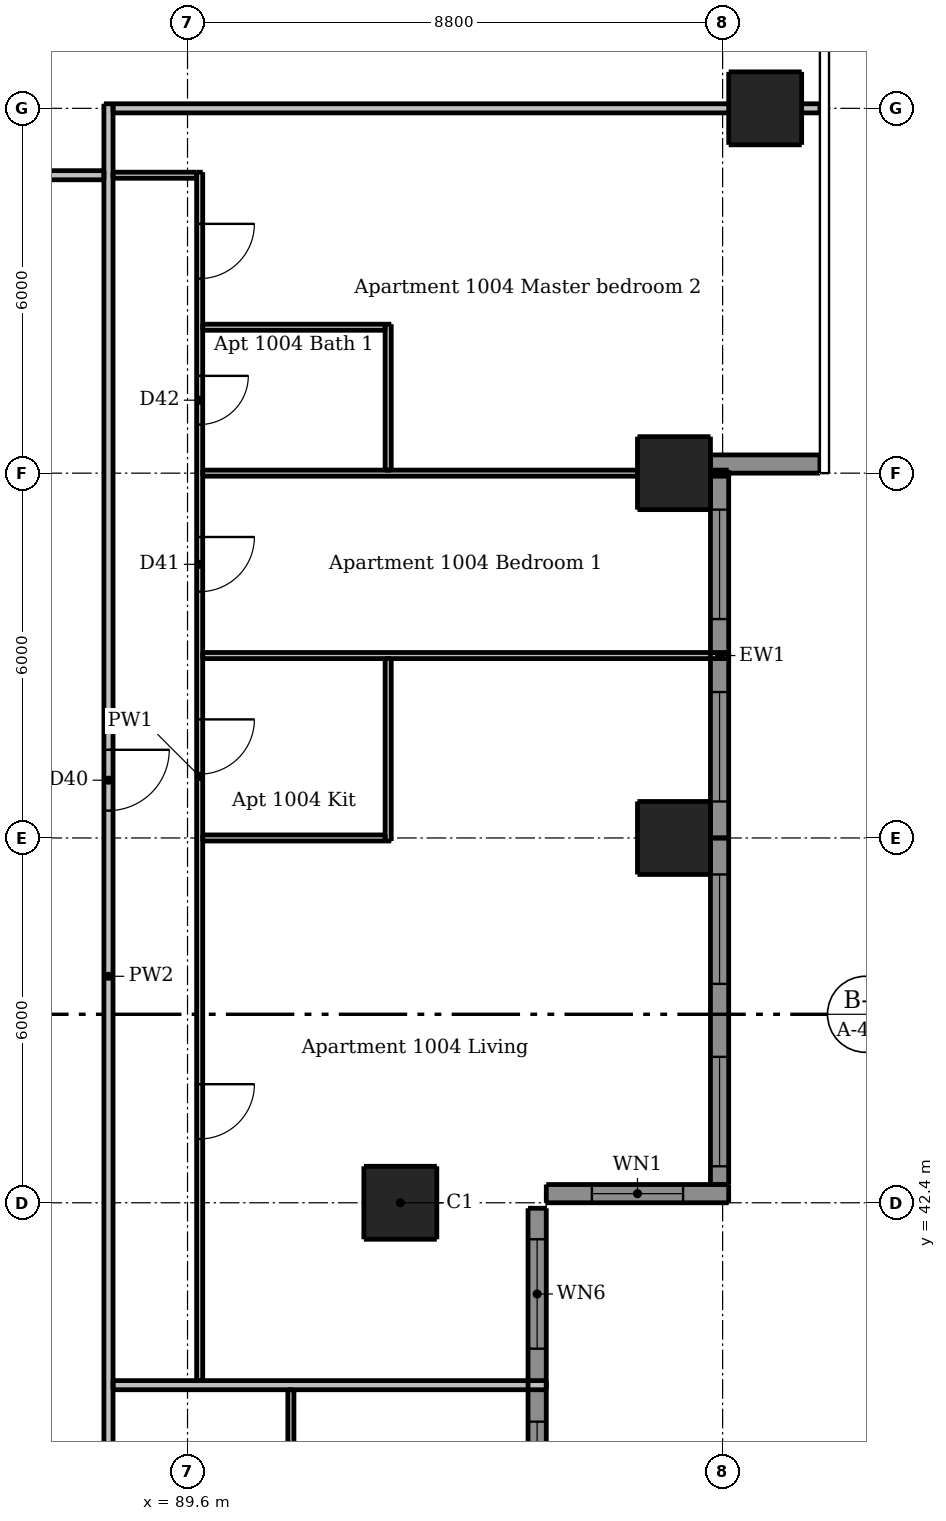
"""IFC4 building model, lengths in metres.
Left out: names, types, materials, properties, quantities, classifications, styles, units other than length and angle.
Written with IfcOpenShell. Run it as: python <this file> out.ifc"""

import sys

from ifc_helpers import new_model, si_unit, direction, frame, frame_2d, origin, origin_2d, place, context, subcontext, project, spatial, rectangle, extrude, element, fill, save


model = new_model("IFC4")
c1 = context("Model", 3, precision=1e-05, world=origin(), true_north=direction((0.0, 1.0)))
c2 = subcontext(c1, "Body", "Model", "MODEL_VIEW")
j1 = project(units=[si_unit("LENGTHUNIT", "METRE"), si_unit("PLANEANGLEUNIT", "RADIAN")], contexts=[c1])
p1 = place(None, origin())
s1 = spatial("IfcSite", under=j1, at=p1, CompositionType="ELEMENT")
p2 = place(p1, origin())
s2 = spatial("IfcBuilding", under=s1, at=p2, CompositionType="ELEMENT")
p3 = place(p2, frame((0.0, 0.0, 40.0)))
s3 = spatial("IfcBuildingStorey", under=s2, at=p3, CompositionType="ELEMENT", Elevation=40.0)
for number, where, z_axis, x_axis in (
    (1, (93.1, 42.4, 0.0), (0.0, 0.0, 1.0), (1.0, 0.0, 0.0)),
    (2, (97.6, 48.4, 0.0), (0.0, 0.0, 1.0), (1.0, 0.0, 0.0)),
    (3, (97.6, 54.4, 0.0), (0.0, 0.0, 1.0), (1.0, 0.0, 0.0)),
    (4, (99.1, 60.4, 0.0), (0.0, 0.0, 1.0), (1.0, 0.0, 0.0)),
):
    element("IfcColumn", number, at=place(p3, frame(where, z_axis=z_axis, x_axis=x_axis)), inside=s3, PredefinedType="COLUMN", context=c2, shape_type="SweptSolid", body=[
        extrude(rectangle(XDim=1.2, YDim=1.2, at=origin_2d()), origin(), (0.0, 0.0, 1.0), 3.05),
    ])
p4 = place(p3, frame((95.5, 42.55, 0.0), z_axis=(0.0, 0.0, 1.0), x_axis=(1.0, 0.0, 0.0)))
e5 = element("IfcWall", 5, at=p4, inside=s3, PredefinedType="SOLIDWALL", context=c2, shape_type="SweptSolid", body=[
    extrude(rectangle(XDim=3.0, YDim=0.3, at=frame_2d((1.5, 0.0))), origin(), (0.0, 0.0, 1.0), 3.05),
])
p5 = place(p4, frame((0.75, 0.0, 0.9)))
e6 = element("IfcOpeningElement", 6, at=p5, cuts=e5, PredefinedType="OPENING", context=c2, shape_type="SweptSolid", body=[
    extrude(rectangle(XDim=1.5, YDim=1.5, at=frame_2d((0.75, 0.75))), frame((0.0, 0.16, 0.0), z_axis=(0.0, -1.0, 0.0), x_axis=(1.0, 0.0, 0.0)), (0.0, 0.0, 1.0), 0.32),
])
p6 = place(p3, frame((98.2, 54.55, 0.0), z_axis=(0.0, 0.0, 1.0), x_axis=(1.0, 0.0, 0.0)))
e7 = element("IfcWall", 7, at=p6, inside=s3, PredefinedType="SOLIDWALL", context=c2, shape_type="SweptSolid", body=[
    extrude(rectangle(XDim=1.8, YDim=0.3, at=frame_2d((0.9, 0.0))), origin(), (0.0, 0.0, 1.0), 3.05),
])
p7 = place(p3, frame((95.35, 36.7, 0.0), z_axis=(0.0, 0.0, 1.0), x_axis=(0.0, 1.0, 0.0)))
e8 = element("IfcWall", 8, at=p7, inside=s3, PredefinedType="SOLIDWALL", context=c2, shape_type="SweptSolid", body=[
    extrude(rectangle(XDim=5.61, YDim=0.3, at=frame_2d((2.805, 0.0))), origin(), (0.0, 0.0, 1.0), 3.05),
])
p8 = place(p7, frame((0.3, 0.0, 0.15)))
e9 = element("IfcOpeningElement", 9, at=p8, cuts=e8, PredefinedType="OPENING", context=c2, shape_type="SweptSolid", body=[
    extrude(rectangle(XDim=1.8, YDim=2.1, at=frame_2d((0.9, 1.05))), frame((0.0, 0.16, 0.0), z_axis=(0.0, -1.0, 0.0), x_axis=(1.0, 0.0, 0.0)), (0.0, 0.0, 1.0), 0.32),
])
p9 = place(p7, frame((3.3, 0.0, 0.15)))
e10 = element("IfcOpeningElement", 10, at=p9, cuts=e8, PredefinedType="OPENING", context=c2, shape_type="SweptSolid", body=[
    extrude(rectangle(XDim=1.8, YDim=2.1, at=frame_2d((0.9, 1.05))), frame((0.0, 0.16, 0.0), z_axis=(0.0, -1.0, 0.0), x_axis=(1.0, 0.0, 0.0)), (0.0, 0.0, 1.0), 0.32),
])
p10 = place(p3, frame((98.35, 42.7, 0.0), z_axis=(0.0, 0.0, 1.0), x_axis=(0.0, 1.0, 0.0)))
e11 = element("IfcWall", 11, at=p10, inside=s3, PredefinedType="SOLIDWALL", context=c2, shape_type="SweptSolid", body=[
    extrude(rectangle(XDim=5.7, YDim=0.3, at=frame_2d((2.85, 0.0))), origin(), (0.0, 0.0, 1.0), 3.05),
])
p11 = place(p10, frame((0.3, 0.0, 0.15)))
e12 = element("IfcOpeningElement", 12, at=p11, cuts=e11, PredefinedType="OPENING", context=c2, shape_type="SweptSolid", body=[
    extrude(rectangle(XDim=1.8, YDim=2.1, at=frame_2d((0.9, 1.05))), frame((0.0, 0.16, 0.0), z_axis=(0.0, -1.0, 0.0), x_axis=(1.0, 0.0, 0.0)), (0.0, 0.0, 1.0), 0.32),
])
p12 = place(p10, frame((3.3, 0.0, 0.15)))
e13 = element("IfcOpeningElement", 13, at=p12, cuts=e11, PredefinedType="OPENING", context=c2, shape_type="SweptSolid", body=[
    extrude(rectangle(XDim=1.8, YDim=2.1, at=frame_2d((0.9, 1.05))), frame((0.0, 0.16, 0.0), z_axis=(0.0, -1.0, 0.0), x_axis=(1.0, 0.0, 0.0)), (0.0, 0.0, 1.0), 0.32),
])
p13 = place(p3, frame((98.35, 48.4, 0.0), z_axis=(0.0, 0.0, 1.0), x_axis=(0.0, 1.0, 0.0)))
e14 = element("IfcWall", 14, at=p13, inside=s3, PredefinedType="SOLIDWALL", context=c2, shape_type="SweptSolid", body=[
    extrude(rectangle(XDim=6.0, YDim=0.3, at=frame_2d((3.0, 0.0))), origin(), (0.0, 0.0, 1.0), 3.05),
])
p14 = place(p13, frame((0.6, 0.0, 0.15)))
e15 = element("IfcOpeningElement", 15, at=p14, cuts=e14, PredefinedType="OPENING", context=c2, shape_type="SweptSolid", body=[
    extrude(rectangle(XDim=1.8, YDim=2.1, at=frame_2d((0.9, 1.05))), frame((0.0, 0.16, 0.0), z_axis=(0.0, -1.0, 0.0), x_axis=(1.0, 0.0, 0.0)), (0.0, 0.0, 1.0), 0.32),
])
p15 = place(p13, frame((3.6, 0.0, 0.15)))
e16 = element("IfcOpeningElement", 16, at=p15, cuts=e14, PredefinedType="OPENING", context=c2, shape_type="SweptSolid", body=[
    extrude(rectangle(XDim=1.8, YDim=2.1, at=frame_2d((0.9, 1.05))), frame((0.0, 0.16, 0.0), z_axis=(0.0, -1.0, 0.0), x_axis=(1.0, 0.0, 0.0)), (0.0, 0.0, 1.0), 0.32),
])
p16 = place(p3, frame((89.8, 59.35, 0.0), z_axis=(0.0, 0.0, 1.0), x_axis=(0.0, -1.0, 0.0)))
e17 = element("IfcWall", 17, at=p16, inside=s3, PredefinedType="PARTITIONING", context=c2, shape_type="SweptSolid", body=[
    extrude(rectangle(XDim=19.875, YDim=0.1, at=frame_2d((9.938, 0.0))), origin(), (0.0, 0.0, 1.0), 3.05),
])
p17 = place(p16, frame((15.0, 0.0, 0.0)))
e18 = element("IfcOpeningElement", 18, at=p17, cuts=e17, PredefinedType="OPENING", context=c2, shape_type="SweptSolid", body=[
    extrude(rectangle(XDim=0.9, YDim=2.1, at=frame_2d((0.45, 1.05))), frame((0.0, 0.06, 0.0), z_axis=(0.0, -1.0, 0.0), x_axis=(1.0, 0.0, 0.0)), (0.0, 0.0, 1.0), 0.12),
])
p18 = place(p16, frame((9.0, 0.0, 0.0)))
e19 = element("IfcOpeningElement", 19, at=p18, cuts=e17, PredefinedType="OPENING", context=c2, shape_type="SweptSolid", body=[
    extrude(rectangle(XDim=0.9, YDim=2.1, at=frame_2d((0.45, 1.05))), frame((0.0, 0.06, 0.0), z_axis=(0.0, -1.0, 0.0), x_axis=(1.0, 0.0, 0.0)), (0.0, 0.0, 1.0), 0.12),
])
p19 = place(p16, frame((6.0, 0.0, 0.0)))
e20 = element("IfcOpeningElement", 20, at=p19, cuts=e17, PredefinedType="OPENING", context=c2, shape_type="SweptSolid", body=[
    extrude(rectangle(XDim=0.9, YDim=2.1, at=frame_2d((0.45, 1.05))), frame((0.0, 0.06, 0.0), z_axis=(0.0, -1.0, 0.0), x_axis=(1.0, 0.0, 0.0)), (0.0, 0.0, 1.0), 0.12),
])
p20 = place(p16, frame((0.85, 0.0, 0.0)))
e21 = element("IfcOpeningElement", 21, at=p20, cuts=e17, PredefinedType="OPENING", context=c2, shape_type="SweptSolid", body=[
    extrude(rectangle(XDim=0.9, YDim=2.1, at=frame_2d((0.45, 1.05))), frame((0.0, 0.06, 0.0), z_axis=(0.0, -1.0, 0.0), x_axis=(1.0, 0.0, 0.0)), (0.0, 0.0, 1.0), 0.12),
])
p21 = place(p16, frame((3.35, 0.0, 0.0)))
e22 = element("IfcOpeningElement", 22, at=p21, cuts=e17, PredefinedType="OPENING", context=c2, shape_type="SweptSolid", body=[
    extrude(rectangle(XDim=0.8, YDim=2.1, at=frame_2d((0.4, 1.05))), frame((0.0, 0.06, 0.0), z_axis=(0.0, -1.0, 0.0), x_axis=(1.0, 0.0, 0.0)), (0.0, 0.0, 1.0), 0.12),
])
p22 = place(p3, frame((91.3, 33.45, 0.0), z_axis=(0.0, 0.0, 1.0), x_axis=(0.0, 1.0, 0.0)))
e23 = element("IfcWall", 23, at=p22, inside=s3, PredefinedType="PARTITIONING", context=c2, shape_type="SweptSolid", body=[
    extrude(rectangle(XDim=5.875, YDim=0.1, at=frame_2d((2.938, 0.0))), origin(), (0.0, 0.0, 1.0), 3.05),
])
p23 = place(p22, frame((3.75, 0.0, 0.0)))
e24 = element("IfcOpeningElement", 24, at=p23, cuts=e23, PredefinedType="OPENING", context=c2, shape_type="SweptSolid", body=[
    extrude(rectangle(XDim=0.8, YDim=2.1, at=frame_2d((0.4, 1.05))), frame((0.0, 0.06, 0.0), z_axis=(0.0, -1.0, 0.0), x_axis=(1.0, 0.0, 0.0)), (0.0, 0.0, 1.0), 0.12),
])
p24 = place(p3, frame((92.9, 48.35, 0.0), z_axis=(0.0, 0.0, 1.0), x_axis=(0.0, 1.0, 0.0)))
e25 = element("IfcWall", 25, at=p24, inside=s3, PredefinedType="PARTITIONING", context=c2, shape_type="SweptSolid", body=[
    extrude(rectangle(XDim=3.0, YDim=0.1, at=frame_2d((1.5, 0.0))), origin(), (0.0, 0.0, 1.0), 3.05),
])
p25 = place(p3, frame((92.9, 54.45, 0.0), z_axis=(0.0, 0.0, 1.0), x_axis=(0.0, 1.0, 0.0)))
e26 = element("IfcWall", 26, at=p25, inside=s3, PredefinedType="PARTITIONING", context=c2, shape_type="SweptSolid", body=[
    extrude(rectangle(XDim=2.4, YDim=0.1, at=frame_2d((1.2, 0.0))), origin(), (0.0, 0.0, 1.0), 3.05),
])
p26 = place(p3, frame((88.375, 59.3, 0.0), z_axis=(0.0, 0.0, 1.0), x_axis=(1.0, 0.0, 0.0)))
e27 = element("IfcWall", 27, at=p26, inside=s3, PredefinedType="PARTITIONING", context=c2, shape_type="SweptSolid", body=[
    extrude(rectangle(XDim=1.375, YDim=0.1, at=frame_2d((0.688, 0.0))), origin(), (0.0, 0.0, 1.0), 3.05),
])
p27 = place(p3, frame((89.85, 56.8, 0.0), z_axis=(0.0, 0.0, 1.0), x_axis=(1.0, 0.0, 0.0)))
e28 = element("IfcWall", 28, at=p27, inside=s3, PredefinedType="PARTITIONING", context=c2, shape_type="SweptSolid", body=[
    extrude(rectangle(XDim=3.0, YDim=0.1, at=frame_2d((1.5, 0.0))), origin(), (0.0, 0.0, 1.0), 3.05),
])
p28 = place(p3, frame((89.85, 54.4, 0.0), z_axis=(0.0, 0.0, 1.0), x_axis=(1.0, 0.0, 0.0)))
e29 = element("IfcWall", 29, at=p28, inside=s3, PredefinedType="PARTITIONING", context=c2, shape_type="SweptSolid", body=[
    extrude(rectangle(XDim=8.65, YDim=0.1, at=frame_2d((4.325, 0.0))), origin(), (0.0, 0.0, 1.0), 2.516),
])
p29 = place(p3, frame((89.85, 51.4, 0.0), z_axis=(0.0, 0.0, 1.0), x_axis=(1.0, 0.0, 0.0)))
e30 = element("IfcWall", 30, at=p29, inside=s3, PredefinedType="PARTITIONING", context=c2, shape_type="SweptSolid", body=[
    extrude(rectangle(XDim=8.65, YDim=0.1, at=frame_2d((4.325, 0.0))), origin(), (0.0, 0.0, 1.0), 3.05),
])
p30 = place(p3, frame((89.85, 48.4, 0.0), z_axis=(0.0, 0.0, 1.0), x_axis=(1.0, 0.0, 0.0)))
e31 = element("IfcWall", 31, at=p30, inside=s3, PredefinedType="PARTITIONING", context=c2, shape_type="SweptSolid", body=[
    extrude(rectangle(XDim=3.0, YDim=0.1, at=frame_2d((1.5, 0.0))), origin(), (0.0, 0.0, 1.0), 2.516),
])
p31 = place(p3, frame((88.3, 60.475, 0.0), z_axis=(0.0, 0.0, 1.0), x_axis=(0.0, -1.0, 0.0)))
e32 = element("IfcWall", 32, at=p31, inside=s3, PredefinedType="PARTITIONING", context=c2, shape_type="SweptSolid", body=[
    extrude(rectangle(XDim=28.7, YDim=0.15, at=frame_2d((14.35, 0.0))), origin(), (0.0, 0.0, 1.0), 3.05),
])
p32 = place(p31, frame((27.425, 0.0, 0.0)))
e33 = element("IfcOpeningElement", 33, at=p32, cuts=e32, PredefinedType="OPENING", context=c2, shape_type="SweptSolid", body=[
    extrude(rectangle(XDim=1.0, YDim=2.1, at=frame_2d((0.5, 1.05))), frame((0.0, 0.085, 0.0), z_axis=(0.0, -1.0, 0.0), x_axis=(1.0, 0.0, 0.0)), (0.0, 0.0, 1.0), 0.17),
])
p33 = place(p31, frame((10.625, 0.0, 0.0)))
e34 = element("IfcOpeningElement", 34, at=p33, cuts=e32, PredefinedType="OPENING", context=c2, shape_type="SweptSolid", body=[
    extrude(rectangle(XDim=1.0, YDim=2.1, at=frame_2d((0.5, 1.05))), frame((0.0, 0.085, 0.0), z_axis=(0.0, -1.0, 0.0), x_axis=(1.0, 0.0, 0.0)), (0.0, 0.0, 1.0), 0.17),
])
p34 = place(p3, frame((88.375, 60.4, 0.0), z_axis=(0.0, 0.0, 1.0), x_axis=(1.0, 0.0, 0.0)))
e35 = element("IfcWall", 35, at=p34, inside=s3, PredefinedType="PARTITIONING", context=c2, shape_type="SweptSolid", body=[
    extrude(rectangle(XDim=11.625, YDim=0.15, at=frame_2d((5.812, 0.0))), origin(), (0.0, 0.0, 1.0), 2.516),
])
p35 = place(p3, frame((59.675, 59.3, 0.0), z_axis=(0.0, 0.0, 1.0), x_axis=(1.0, 0.0, 0.0)))
e36 = element("IfcWall", 36, at=p35, inside=s3, PredefinedType="PARTITIONING", context=c2, shape_type="SweptSolid", body=[
    extrude(rectangle(XDim=28.55, YDim=0.15, at=frame_2d((14.275, 0.0))), origin(), (0.0, 0.0, 1.0), 3.05),
])
p36 = place(p35, frame((8.975, 0.0, 0.0)))
e37 = element("IfcOpeningElement", 37, at=p36, cuts=e36, PredefinedType="OPENING", context=c2, shape_type="SweptSolid", body=[
    extrude(rectangle(XDim=1.0, YDim=2.1, at=frame_2d((0.5, 1.05))), frame((0.0, 0.085, 0.0), z_axis=(0.0, -1.0, 0.0), x_axis=(1.0, 0.0, 0.0)), (0.0, 0.0, 1.0), 0.17),
])
p37 = place(p35, frame((25.775, 0.0, 0.0)))
e38 = element("IfcOpeningElement", 38, at=p37, cuts=e36, PredefinedType="OPENING", context=c2, shape_type="SweptSolid", body=[
    extrude(rectangle(XDim=1.0, YDim=2.1, at=frame_2d((0.5, 1.05))), frame((0.0, 0.085, 0.0), z_axis=(0.0, -1.0, 0.0), x_axis=(1.0, 0.0, 0.0)), (0.0, 0.0, 1.0), 0.17),
])
p38 = place(p3, frame((88.375, 39.4, 0.0), z_axis=(0.0, 0.0, 1.0), x_axis=(1.0, 0.0, 0.0)))
e39 = element("IfcWall", 39, at=p38, inside=s3, PredefinedType="PARTITIONING", context=c2, shape_type="SweptSolid", body=[
    extrude(rectangle(XDim=7.125, YDim=0.15, at=frame_2d((3.562, 0.0))), origin(), (0.0, 0.0, 1.0), 3.05),
])
p39 = place(p5, origin())
e40 = element("IfcWindow", 40, at=p39, inside=s3, PartitioningType="DOUBLE_PANEL_VERTICAL", PredefinedType="WINDOW", context=c2, shape_type="SweptSolid", body=[
    extrude(rectangle(XDim=1.5, YDim=1.5, at=frame_2d((0.75, 0.75))), frame((0.0, 0.03, 0.0), z_axis=(0.0, -1.0, 0.0), x_axis=(1.0, 0.0, 0.0)), (0.0, 0.0, 1.0), 0.06),
])
fill(e6, e40)
p40 = place(p8, origin())
e41 = element("IfcWindow", 41, at=p40, inside=s3, PartitioningType="DOUBLE_PANEL_VERTICAL", PredefinedType="WINDOW", context=c2, shape_type="SweptSolid", body=[
    extrude(rectangle(XDim=1.8, YDim=2.1, at=frame_2d((0.9, 1.05))), frame((0.0, 0.03, 0.0), z_axis=(0.0, -1.0, 0.0), x_axis=(1.0, 0.0, 0.0)), (0.0, 0.0, 1.0), 0.06),
])
fill(e9, e41)
p41 = place(p9, origin())
e42 = element("IfcWindow", 42, at=p41, inside=s3, PartitioningType="DOUBLE_PANEL_VERTICAL", PredefinedType="WINDOW", context=c2, shape_type="SweptSolid", body=[
    extrude(rectangle(XDim=1.8, YDim=2.1, at=frame_2d((0.9, 1.05))), frame((0.0, 0.03, 0.0), z_axis=(0.0, -1.0, 0.0), x_axis=(1.0, 0.0, 0.0)), (0.0, 0.0, 1.0), 0.06),
])
fill(e10, e42)
p42 = place(p11, origin())
e43 = element("IfcWindow", 43, at=p42, inside=s3, PartitioningType="DOUBLE_PANEL_VERTICAL", PredefinedType="WINDOW", context=c2, shape_type="SweptSolid", body=[
    extrude(rectangle(XDim=1.8, YDim=2.1, at=frame_2d((0.9, 1.05))), frame((0.0, 0.03, 0.0), z_axis=(0.0, -1.0, 0.0), x_axis=(1.0, 0.0, 0.0)), (0.0, 0.0, 1.0), 0.06),
])
fill(e12, e43)
p43 = place(p12, origin())
e44 = element("IfcWindow", 44, at=p43, inside=s3, PartitioningType="DOUBLE_PANEL_VERTICAL", PredefinedType="WINDOW", context=c2, shape_type="SweptSolid", body=[
    extrude(rectangle(XDim=1.8, YDim=2.1, at=frame_2d((0.9, 1.05))), frame((0.0, 0.03, 0.0), z_axis=(0.0, -1.0, 0.0), x_axis=(1.0, 0.0, 0.0)), (0.0, 0.0, 1.0), 0.06),
])
fill(e13, e44)
p44 = place(p14, origin())
e45 = element("IfcWindow", 45, at=p44, inside=s3, PartitioningType="DOUBLE_PANEL_VERTICAL", PredefinedType="WINDOW", context=c2, shape_type="SweptSolid", body=[
    extrude(rectangle(XDim=1.8, YDim=2.1, at=frame_2d((0.9, 1.05))), frame((0.0, 0.03, 0.0), z_axis=(0.0, -1.0, 0.0), x_axis=(1.0, 0.0, 0.0)), (0.0, 0.0, 1.0), 0.06),
])
fill(e15, e45)
p45 = place(p15, origin())
e46 = element("IfcWindow", 46, at=p45, inside=s3, PartitioningType="DOUBLE_PANEL_VERTICAL", PredefinedType="WINDOW", context=c2, shape_type="SweptSolid", body=[
    extrude(rectangle(XDim=1.8, YDim=2.1, at=frame_2d((0.9, 1.05))), frame((0.0, 0.03, 0.0), z_axis=(0.0, -1.0, 0.0), x_axis=(1.0, 0.0, 0.0)), (0.0, 0.0, 1.0), 0.06),
])
fill(e16, e46)
p46 = place(p33, origin())
e47 = element("IfcDoor", 47, at=p46, inside=s3, OperationType="SINGLE_SWING_LEFT", PredefinedType="DOOR", context=c2, shape_type="SweptSolid", body=[
    extrude(rectangle(XDim=1.0, YDim=2.1, at=frame_2d((0.5, 1.05))), frame((0.0, 0.025, 0.0), z_axis=(0.0, -1.0, 0.0), x_axis=(1.0, 0.0, 0.0)), (0.0, 0.0, 1.0), 0.05),
])
fill(e34, e47)
p47 = place(p17, origin())
e48 = element("IfcDoor", 48, at=p47, inside=s3, OperationType="SINGLE_SWING_LEFT", PredefinedType="DOOR", context=c2, shape_type="SweptSolid", body=[
    extrude(rectangle(XDim=0.9, YDim=2.1, at=frame_2d((0.45, 1.05))), frame((0.0, 0.025, 0.0), z_axis=(0.0, -1.0, 0.0), x_axis=(1.0, 0.0, 0.0)), (0.0, 0.0, 1.0), 0.05),
])
fill(e18, e48)
p48 = place(p18, origin())
e49 = element("IfcDoor", 49, at=p48, inside=s3, OperationType="SINGLE_SWING_LEFT", PredefinedType="DOOR", context=c2, shape_type="SweptSolid", body=[
    extrude(rectangle(XDim=0.9, YDim=2.1, at=frame_2d((0.45, 1.05))), frame((0.0, 0.025, 0.0), z_axis=(0.0, -1.0, 0.0), x_axis=(1.0, 0.0, 0.0)), (0.0, 0.0, 1.0), 0.05),
])
fill(e19, e49)
p49 = place(p19, origin())
e50 = element("IfcDoor", 50, at=p49, inside=s3, OperationType="SINGLE_SWING_LEFT", PredefinedType="DOOR", context=c2, shape_type="SweptSolid", body=[
    extrude(rectangle(XDim=0.9, YDim=2.1, at=frame_2d((0.45, 1.05))), frame((0.0, 0.025, 0.0), z_axis=(0.0, -1.0, 0.0), x_axis=(1.0, 0.0, 0.0)), (0.0, 0.0, 1.0), 0.05),
])
fill(e20, e50)
p50 = place(p20, origin())
e51 = element("IfcDoor", 51, at=p50, inside=s3, OperationType="SINGLE_SWING_LEFT", PredefinedType="DOOR", context=c2, shape_type="SweptSolid", body=[
    extrude(rectangle(XDim=0.9, YDim=2.1, at=frame_2d((0.45, 1.05))), frame((0.0, 0.025, 0.0), z_axis=(0.0, -1.0, 0.0), x_axis=(1.0, 0.0, 0.0)), (0.0, 0.0, 1.0), 0.05),
])
fill(e21, e51)
p51 = place(p21, origin())
e52 = element("IfcDoor", 52, at=p51, inside=s3, OperationType="SINGLE_SWING_LEFT", PredefinedType="DOOR", context=c2, shape_type="SweptSolid", body=[
    extrude(rectangle(XDim=0.8, YDim=2.1, at=frame_2d((0.4, 1.05))), frame((0.0, 0.025, 0.0), z_axis=(0.0, -1.0, 0.0), x_axis=(1.0, 0.0, 0.0)), (0.0, 0.0, 1.0), 0.05),
])
fill(e22, e52)
save(model, sys.argv[1])
